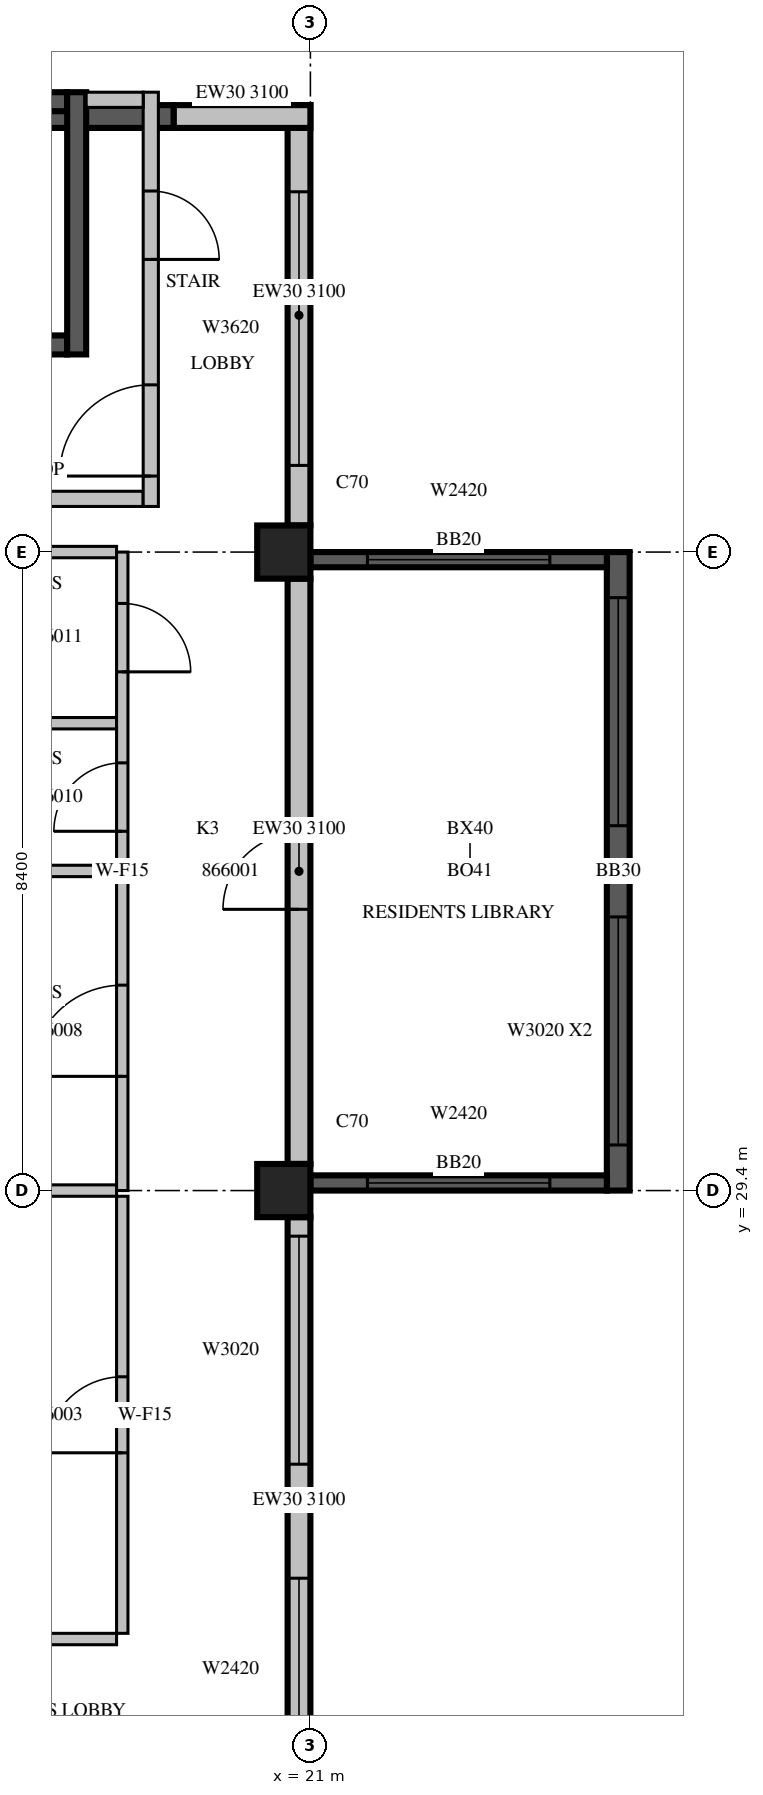
"""IFC4 building model, lengths in metres.
Left out: names, types, materials, properties, quantities, classifications, styles, units other than length and angle.
Written with IfcOpenShell. Run it as: python <this file> out.ifc"""

import sys

from ifc_helpers import new_model, si_unit, direction, frame, frame_2d, origin, origin_2d, place, context, subcontext, project, spatial, rectangle, extrude, source, transform, mapped, element, fill, save


model = new_model("IFC4")
c1 = context("Model", 3, precision=1e-05, world=origin(), true_north=direction((0.0, 1.0)))
c2 = subcontext(c1, "Body", "Model", "MODEL_VIEW")
j1 = project(units=[si_unit("LENGTHUNIT", "METRE"), si_unit("PLANEANGLEUNIT", "RADIAN")], contexts=[c1])
p1 = place(None, origin())
s1 = spatial("IfcSite", under=j1, at=p1, CompositionType="ELEMENT")
p2 = place(p1, origin())
s2 = spatial("IfcBuilding", under=s1, at=p2, CompositionType="ELEMENT")
p3 = place(p2, frame((0.0, 0.0, 291.5)))
s3 = spatial("IfcBuildingStorey", under=s2, at=p3, CompositionType="ELEMENT", Elevation=291.5)
m1 = source(origin(), c2, "Body", "SweptSolid", [
    extrude(rectangle(XDim=0.7, YDim=0.7, at=origin_2d()), origin(), (0.0, 0.0, 1.0), 3.5),
])
for number, where, z_axis, x_axis in (
    (1, (20.65, 29.4, 0.0), (0.0, 0.0, 1.0), (1.0, 0.0, 0.0)),
    (2, (20.65, 37.8, 0.0), (0.0, 0.0, 1.0), (1.0, 0.0, 0.0)),
):
    element("IfcColumn", number, at=place(p3, frame(where, z_axis=z_axis, x_axis=x_axis)), inside=s3, PredefinedType="COLUMN", context=c2, shape_type="MappedRepresentation", body=[
        mapped(m1, transform((0.0, 0.0, 0.0), scale=1.0)),
    ])
p4 = place(p3, frame((25.05, 29.4, 0.0), z_axis=(0.0, 0.0, 1.0), x_axis=(0.0, 1.0, 0.0)))
e3 = element("IfcWall", 3, at=p4, inside=s3, PredefinedType="SOLIDWALL", context=c2, shape_type="SweptSolid", body=[
    extrude(rectangle(XDim=8.4, YDim=0.3, at=frame_2d((4.2, 0.0))), origin(), (0.0, 0.0, 1.0), 3.1),
])
m2 = source(origin(), c2, "Body", "SweptSolid", [
    extrude(rectangle(XDim=3.0, YDim=2.0, at=frame_2d((1.5, 1.0))), frame((0.0, 0.16, 0.0), z_axis=(0.0, -1.0, 0.0), x_axis=(1.0, 0.0, 0.0)), (0.0, 0.0, 1.0), 0.32),
])
p5 = place(p4, frame((0.6, 0.0, 0.6)))
e4 = element("IfcOpeningElement", 4, at=p5, cuts=e3, PredefinedType="OPENING", context=c2, shape_type="MappedRepresentation", body=[
    mapped(m2, transform((0.0, 0.0, 0.0), scale=1.0)),
])
p6 = place(p4, frame((4.8, 0.0, 0.6)))
e5 = element("IfcOpeningElement", 5, at=p6, cuts=e3, PredefinedType="OPENING", context=c2, shape_type="MappedRepresentation", body=[
    mapped(m2, transform((0.0, 0.0, 0.0), scale=1.0)),
])
m3 = source(origin(), c2, "Body", "SweptSolid", [
    extrude(rectangle(XDim=3.9, YDim=0.2, at=frame_2d((1.95, 0.0))), origin(), (0.0, 0.0, 1.0), 3.1),
])
p7 = place(p3, frame((21.0, 29.5, 0.0), z_axis=(0.0, 0.0, 1.0), x_axis=(1.0, 0.0, 0.0)))
e6 = element("IfcWall", 6, at=p7, inside=s3, PredefinedType="SOLIDWALL", context=c2, shape_type="MappedRepresentation", body=[
    mapped(m3, transform((0.0, 0.0, 0.0), scale=1.0)),
])
m4 = source(origin(), c2, "Body", "SweptSolid", [
    extrude(rectangle(XDim=2.4, YDim=2.0, at=frame_2d((1.2, 1.0))), frame((0.0, 0.11, 0.0), z_axis=(0.0, -1.0, 0.0), x_axis=(1.0, 0.0, 0.0)), (0.0, 0.0, 1.0), 0.22),
])
p8 = place(p7, frame((0.75, 0.0, 0.6)))
e7 = element("IfcOpeningElement", 7, at=p8, cuts=e6, PredefinedType="OPENING", context=c2, shape_type="MappedRepresentation", body=[
    mapped(m4, transform((0.0, 0.0, 0.0), scale=1.0)),
])
p9 = place(p3, frame((21.0, 37.7, 0.0), z_axis=(0.0, 0.0, 1.0), x_axis=(1.0, 0.0, 0.0)))
e8 = element("IfcWall", 8, at=p9, inside=s3, PredefinedType="SOLIDWALL", context=c2, shape_type="MappedRepresentation", body=[
    mapped(m3, transform((0.0, 0.0, 0.0), scale=1.0)),
])
p10 = place(p9, frame((0.75, 0.0, 0.6)))
e9 = element("IfcOpeningElement", 9, at=p10, cuts=e8, PredefinedType="OPENING", context=c2, shape_type="MappedRepresentation", body=[
    mapped(m4, transform((0.0, 0.0, 0.0), scale=1.0)),
])
m5 = source(origin(), c2, "Body", "SweptSolid", [
    extrude(rectangle(XDim=7.45, YDim=0.3, at=frame_2d((3.725, 0.0))), origin(), (0.0, 0.0, 1.0), 3.1),
])
p11 = place(p3, frame((20.85, 21.6, 0.0), z_axis=(0.0, 0.0, 1.0), x_axis=(0.0, 1.0, 0.0)))
e10 = element("IfcWall", 10, at=p11, inside=s3, PredefinedType="STANDARD", context=c2, shape_type="MappedRepresentation", body=[
    mapped(m5, transform((0.0, 0.0, 0.0), scale=1.0)),
])
m6 = source(origin(), c2, "Body", "SweptSolid", [
    extrude(rectangle(XDim=2.4, YDim=2.0, at=frame_2d((1.2, 1.0))), frame((0.0, 0.16, 0.0), z_axis=(0.0, -1.0, 0.0), x_axis=(1.0, 0.0, 0.0)), (0.0, 0.0, 1.0), 0.32),
])
p12 = place(p11, frame((0.3, 0.0, 0.6)))
e11 = element("IfcOpeningElement", 11, at=p12, cuts=e10, PredefinedType="OPENING", context=c2, shape_type="MappedRepresentation", body=[
    mapped(m6, transform((0.0, 0.0, 0.0), scale=1.0)),
])
p13 = place(p11, frame((4.2, 0.0, 0.6)))
e12 = element("IfcOpeningElement", 12, at=p13, cuts=e10, PredefinedType="OPENING", context=c2, shape_type="MappedRepresentation", body=[
    mapped(m2, transform((0.0, 0.0, 0.0), scale=1.0)),
])
m7 = source(origin(), c2, "Body", "SweptSolid", [
    extrude(rectangle(XDim=7.7, YDim=0.3, at=frame_2d((3.85, 0.0))), origin(), (0.0, 0.0, 1.0), 3.1),
])
p14 = place(p3, frame((20.85, 29.75, 0.0), z_axis=(0.0, 0.0, 1.0), x_axis=(0.0, 1.0, 0.0)))
e13 = element("IfcWall", 13, at=p14, inside=s3, PredefinedType="STANDARD", context=c2, shape_type="MappedRepresentation", body=[
    mapped(m7, transform((0.0, 0.0, 0.0), scale=1.0)),
])
m8 = source(origin(), c2, "Body", "SweptSolid", [
    extrude(rectangle(XDim=1.0, YDim=2.1, at=frame_2d((0.5, 1.05))), frame((0.0, 0.16, 0.0), z_axis=(0.0, -1.0, 0.0), x_axis=(1.0, 0.0, 0.0)), (0.0, 0.0, 1.0), 0.32),
])
p15 = place(p14, frame((3.35, 0.0, 0.0)))
e14 = element("IfcOpeningElement", 14, at=p15, cuts=e13, PredefinedType="OPENING", context=c2, shape_type="MappedRepresentation", body=[
    mapped(m8, transform((0.0, 0.0, 0.0), scale=1.0)),
])
m9 = source(origin(), c2, "Body", "SweptSolid", [
    extrude(rectangle(XDim=5.53, YDim=0.3, at=frame_2d((2.765, 0.0))), origin(), (0.0, 0.0, 1.0), 3.1),
])
p16 = place(p3, frame((20.85, 38.15, 0.0), z_axis=(0.0, 0.0, 1.0), x_axis=(0.0, 1.0, 0.0)))
e15 = element("IfcWall", 15, at=p16, inside=s3, PredefinedType="STANDARD", context=c2, shape_type="MappedRepresentation", body=[
    mapped(m9, transform((0.0, 0.0, 0.0), scale=1.0)),
])
m10 = source(origin(), c2, "Body", "SweptSolid", [
    extrude(rectangle(XDim=3.6, YDim=2.0, at=frame_2d((1.8, 1.0))), frame((0.0, 0.16, 0.0), z_axis=(0.0, -1.0, 0.0), x_axis=(1.0, 0.0, 0.0)), (0.0, 0.0, 1.0), 0.32),
])
p17 = place(p16, frame((0.79, 0.0, 0.6)))
e16 = element("IfcOpeningElement", 16, at=p17, cuts=e15, PredefinedType="OPENING", context=c2, shape_type="MappedRepresentation", body=[
    mapped(m10, transform((0.0, 0.0, 0.0), scale=1.0)),
])
m11 = source(origin(), c2, "Body", "SweptSolid", [
    extrude(rectangle(XDim=1.8, YDim=0.3, at=frame_2d((0.9, 0.0))), origin(), (0.0, 0.0, 1.0), 3.1),
])
p18 = place(p3, frame((21.0, 43.53, 0.0), z_axis=(0.0, 0.0, 1.0), x_axis=(-1.0, 0.0, 0.0)))
e17 = element("IfcWall", 17, at=p18, inside=s3, PredefinedType="STANDARD", context=c2, shape_type="MappedRepresentation", body=[
    mapped(m11, transform((0.0, 0.0, 0.0), scale=1.0)),
])
m12 = source(origin(), c2, "Body", "SweptSolid", [
    extrude(rectangle(XDim=8.6, YDim=0.3, at=frame_2d((4.3, 0.0))), origin(), (0.0, 0.0, 1.0), 3.1),
])
p19 = place(p3, frame((19.2, 43.53, 0.0), z_axis=(0.0, 0.0, 1.0), x_axis=(-1.0, 0.0, 0.0)))
e18 = element("IfcWall", 18, at=p19, inside=s3, PredefinedType="SOLIDWALL", context=c2, shape_type="MappedRepresentation", body=[
    mapped(m12, transform((0.0, 0.0, 0.0), scale=1.0)),
])
m13 = source(origin(), c2, "Body", "SweptSolid", [
    extrude(rectangle(XDim=7.0, YDim=0.25, at=frame_2d((3.5, 0.0))), origin(), (0.0, 0.0, 1.0), 3.1),
])
p20 = place(p3, frame((10.8, 40.525, 0.0), z_axis=(0.0, 0.0, 1.0), x_axis=(1.0, 0.0, 0.0)))
e19 = element("IfcWall", 19, at=p20, inside=s3, PredefinedType="SOLIDWALL", context=c2, shape_type="MappedRepresentation", body=[
    mapped(m13, transform((0.0, 0.0, 0.0), scale=1.0)),
])
m14 = source(origin(), c2, "Body", "SweptSolid", [
    extrude(rectangle(XDim=1.1, YDim=2.1, at=frame_2d((0.55, 1.05))), frame((0.0, 0.135, 0.0), z_axis=(0.0, -1.0, 0.0), x_axis=(1.0, 0.0, 0.0)), (0.0, 0.0, 1.0), 0.27),
])
p21 = place(p20, frame((0.55, 0.0, 0.0)))
e20 = element("IfcOpeningElement", 20, at=p21, cuts=e19, PredefinedType="OPENING", context=c2, shape_type="MappedRepresentation", body=[
    mapped(m14, transform((0.0, 0.0, 0.0), scale=1.0)),
])
p22 = place(p3, frame((10.8, 43.725, 0.0), z_axis=(0.0, 0.0, 1.0), x_axis=(1.0, 0.0, 0.0)))
e21 = element("IfcWall", 21, at=p22, inside=s3, PredefinedType="SOLIDWALL", context=c2, shape_type="MappedRepresentation", body=[
    mapped(m13, transform((0.0, 0.0, 0.0), scale=1.0)),
])
m15 = source(origin(), c2, "Body", "SweptSolid", [
    extrude(rectangle(XDim=3.45, YDim=0.25, at=frame_2d((1.725, 0.0))), origin(), (0.0, 0.0, 1.0), 3.1),
])
p23 = place(p3, frame((17.925, 40.4, 0.0), z_axis=(0.0, 0.0, 1.0), x_axis=(0.0, 1.0, 0.0)))
e22 = element("IfcWall", 22, at=p23, inside=s3, PredefinedType="SOLIDWALL", context=c2, shape_type="MappedRepresentation", body=[
    mapped(m15, transform((0.0, 0.0, 0.0), scale=1.0)),
])
m16 = source(origin(), c2, "Body", "SweptSolid", [
    extrude(rectangle(XDim=8.0, YDim=0.2, at=frame_2d((4.0, 0.0))), origin(), (0.0, 0.0, 1.0), 3.1),
])
p24 = place(p3, frame((10.8, 38.5, 0.0), z_axis=(0.0, 0.0, 1.0), x_axis=(1.0, 0.0, 0.0)))
e23 = element("IfcWall", 23, at=p24, inside=s3, PredefinedType="PARTITIONING", context=c2, shape_type="MappedRepresentation", body=[
    mapped(m16, transform((0.0, 0.0, 0.0), scale=1.0)),
])
m17 = source(origin(), c2, "Body", "SweptSolid", [
    extrude(rectangle(XDim=5.45, YDim=0.2, at=frame_2d((2.725, 0.0))), origin(), (0.0, 0.0, 1.0), 3.1),
])
p25 = place(p3, frame((18.9, 38.4, 0.0), z_axis=(0.0, 0.0, 1.0), x_axis=(0.0, 1.0, 0.0)))
e24 = element("IfcWall", 24, at=p25, inside=s3, PredefinedType="PARTITIONING", context=c2, shape_type="MappedRepresentation", body=[
    mapped(m17, transform((0.0, 0.0, 0.0), scale=1.0)),
])
m18 = source(origin(), c2, "Body", "SweptSolid", [
    extrude(rectangle(XDim=1.2, YDim=2.1, at=frame_2d((0.6, 1.05))), frame((0.0, 0.11, 0.0), z_axis=(0.0, -1.0, 0.0), x_axis=(1.0, 0.0, 0.0)), (0.0, 0.0, 1.0), 0.22),
])
p26 = place(p25, frame((0.4, 0.0, 0.0)))
e25 = element("IfcOpeningElement", 25, at=p26, cuts=e24, PredefinedType="OPENING", context=c2, shape_type="MappedRepresentation", body=[
    mapped(m18, transform((0.0, 0.0, 0.0), scale=1.0)),
])
m19 = source(origin(), c2, "Body", "SweptSolid", [
    extrude(rectangle(XDim=0.9, YDim=2.1, at=frame_2d((0.45, 1.05))), frame((0.0, 0.11, 0.0), z_axis=(0.0, -1.0, 0.0), x_axis=(1.0, 0.0, 0.0)), (0.0, 0.0, 1.0), 0.22),
])
p27 = place(p25, frame((3.25, 0.0, 0.0)))
e26 = element("IfcOpeningElement", 26, at=p27, cuts=e24, PredefinedType="OPENING", context=c2, shape_type="MappedRepresentation", body=[
    mapped(m19, transform((0.0, 0.0, 0.0), scale=1.0)),
])
m20 = source(origin(), c2, "Body", "SweptSolid", [
    extrude(rectangle(XDim=0.75, YDim=0.2, at=frame_2d((0.375, 0.0))), origin(), (0.0, 0.0, 1.0), 3.1),
])
p28 = place(p3, frame((18.05, 43.75, 0.0), z_axis=(0.0, 0.0, 1.0), x_axis=(1.0, 0.0, 0.0)))
e27 = element("IfcWall", 27, at=p28, inside=s3, PredefinedType="PARTITIONING", context=c2, shape_type="MappedRepresentation", body=[
    mapped(m20, transform((0.0, 0.0, 0.0), scale=1.0)),
])
p29 = place(p3, frame((14.175, 23.5, 0.0), z_axis=(0.0, 0.0, 1.0), x_axis=(1.0, 0.0, 0.0)))
e28 = element("IfcWall", 28, at=p29, inside=s3, PredefinedType="PARTITIONING", context=c2, shape_type="SweptSolid", body=[
    extrude(rectangle(XDim=4.275, YDim=0.15, at=frame_2d((2.138, 0.0))), origin(), (0.0, 0.0, 1.0), 3.1),
])
m21 = source(origin(), c2, "Body", "SweptSolid", [
    extrude(rectangle(XDim=0.9, YDim=2.1, at=frame_2d((0.45, 1.05))), frame((0.0, 0.085, 0.0), z_axis=(0.0, -1.0, 0.0), x_axis=(1.0, 0.0, 0.0)), (0.0, 0.0, 1.0), 0.17),
])
p30 = place(p29, frame((0.619, 0.0, 0.0)))
e29 = element("IfcOpeningElement", 29, at=p30, cuts=e28, PredefinedType="OPENING", context=c2, shape_type="MappedRepresentation", body=[
    mapped(m21, transform((0.0, 0.0, 0.0), scale=1.0)),
])
m22 = source(origin(), c2, "Body", "SweptSolid", [
    extrude(rectangle(XDim=4.275, YDim=0.15, at=frame_2d((2.138, 0.0))), origin(), (0.0, 0.0, 1.0), 3.1),
])
p31 = place(p3, frame((18.45, 29.4, 0.0), z_axis=(0.0, 0.0, 1.0), x_axis=(-1.0, 0.0, 0.0)))
e30 = element("IfcWall", 30, at=p31, inside=s3, PredefinedType="PARTITIONING", context=c2, shape_type="MappedRepresentation", body=[
    mapped(m22, transform((0.0, 0.0, 0.0), scale=1.0)),
])
m23 = source(origin(), c2, "Body", "SweptSolid", [
    extrude(rectangle(XDim=5.75, YDim=0.15, at=frame_2d((2.875, 0.0))), origin(), (0.0, 0.0, 1.0), 3.1),
])
p32 = place(p3, frame((18.525, 23.575, 0.0), z_axis=(0.0, 0.0, 1.0), x_axis=(0.0, 1.0, 0.0)))
e31 = element("IfcWall", 31, at=p32, inside=s3, PredefinedType="PARTITIONING", context=c2, shape_type="MappedRepresentation", body=[
    mapped(m23, transform((0.0, 0.0, 0.0), scale=1.0)),
])
m24 = source(origin(), c2, "Body", "SweptSolid", [
    extrude(rectangle(XDim=1.0, YDim=2.1, at=frame_2d((0.5, 1.05))), frame((0.0, 0.085, 0.0), z_axis=(0.0, -1.0, 0.0), x_axis=(1.0, 0.0, 0.0)), (0.0, 0.0, 1.0), 0.17),
])
p33 = place(p32, frame((2.375, 0.0, 0.0)))
e32 = element("IfcOpeningElement", 32, at=p33, cuts=e31, PredefinedType="OPENING", context=c2, shape_type="MappedRepresentation", body=[
    mapped(m24, transform((0.0, 0.0, 0.0), scale=1.0)),
])
p34 = place(p3, frame((18.45, 33.605, 0.0), z_axis=(0.0, 0.0, 1.0), x_axis=(-1.0, 0.0, 0.0)))
e33 = element("IfcWall", 33, at=p34, inside=s3, PredefinedType="PARTITIONING", context=c2, shape_type="SweptSolid", body=[
    extrude(rectangle(XDim=2.8, YDim=0.15, at=frame_2d((1.4, 0.0))), origin(), (0.0, 0.0, 1.0), 3.1),
])
m25 = source(origin(), c2, "Body", "SweptSolid", [
    extrude(rectangle(XDim=2.8, YDim=0.15, at=frame_2d((1.4, 0.0))), origin(), (0.0, 0.0, 1.0), 3.1),
])
for number, where, z_axis, x_axis in (
    (34, (18.45, 35.548, 0.0), (0.0, 0.0, 1.0), (-1.0, 0.0, 0.0)),
    (35, (18.45, 37.8, 0.0), (0.0, 0.0, 1.0), (-1.0, 0.0, 0.0)),
):
    element("IfcWall", number, at=place(p3, frame(where, z_axis=z_axis, x_axis=x_axis)), inside=s3, PredefinedType="PARTITIONING", context=c2, shape_type="MappedRepresentation", body=[
        mapped(m25, transform((0.0, 0.0, 0.0), scale=1.0)),
    ])
m26 = source(origin(), c2, "Body", "SweptSolid", [
    extrude(rectangle(XDim=8.4, YDim=0.15, at=frame_2d((4.2, 0.0))), origin(), (0.0, 0.0, 1.0), 3.1),
])
p35 = place(p3, frame((18.525, 29.4, 0.0), z_axis=(0.0, 0.0, 1.0), x_axis=(0.0, 1.0, 0.0)))
e36 = element("IfcWall", 36, at=p35, inside=s3, PredefinedType="PARTITIONING", context=c2, shape_type="MappedRepresentation", body=[
    mapped(m26, transform((0.0, 0.0, 0.0), scale=1.0)),
])
m27 = source(origin(), c2, "Body", "SweptSolid", [
    extrude(rectangle(XDim=1.2, YDim=2.1, at=frame_2d((0.6, 1.05))), frame((0.0, 0.085, 0.0), z_axis=(0.0, -1.0, 0.0), x_axis=(1.0, 0.0, 0.0)), (0.0, 0.0, 1.0), 0.17),
])
p36 = place(p35, frame((1.502, 0.0, 0.0)))
e37 = element("IfcOpeningElement", 37, at=p36, cuts=e36, PredefinedType="OPENING", context=c2, shape_type="MappedRepresentation", body=[
    mapped(m27, transform((0.0, 0.0, 0.0), scale=1.0)),
])
p37 = place(p35, frame((4.727, 0.0, 0.0)))
e38 = element("IfcOpeningElement", 38, at=p37, cuts=e36, PredefinedType="OPENING", context=c2, shape_type="MappedRepresentation", body=[
    mapped(m21, transform((0.0, 0.0, 0.0), scale=1.0)),
])
p38 = place(p35, frame((6.824, 0.0, 0.0)))
e39 = element("IfcOpeningElement", 39, at=p38, cuts=e36, PredefinedType="OPENING", context=c2, shape_type="MappedRepresentation", body=[
    mapped(m21, transform((0.0, 0.0, 0.0), scale=1.0)),
])
m28 = source(origin(), c2, "Body", "SweptSolid", [
    extrude(rectangle(XDim=3.0, YDim=2.0, at=frame_2d((1.5, 1.0))), frame((0.0, 0.03, 0.0), z_axis=(0.0, -1.0, 0.0), x_axis=(1.0, 0.0, 0.0)), (0.0, 0.0, 1.0), 0.06),
])
p39 = place(p5, origin())
e40 = element("IfcWindow", 40, at=p39, inside=s3, PartitioningType="SINGLE_PANEL", PredefinedType="WINDOW", context=c2, shape_type="MappedRepresentation", body=[
    mapped(m28, transform((0.0, 0.0, 0.0), scale=1.0)),
])
fill(e4, e40)
p40 = place(p6, origin())
e41 = element("IfcWindow", 41, at=p40, inside=s3, PartitioningType="SINGLE_PANEL", PredefinedType="WINDOW", context=c2, shape_type="MappedRepresentation", body=[
    mapped(m28, transform((0.0, 0.0, 0.0), scale=1.0)),
])
fill(e5, e41)
m29 = source(origin(), c2, "Body", "SweptSolid", [
    extrude(rectangle(XDim=2.4, YDim=2.0, at=frame_2d((1.2, 1.0))), frame((0.0, 0.03, 0.0), z_axis=(0.0, -1.0, 0.0), x_axis=(1.0, 0.0, 0.0)), (0.0, 0.0, 1.0), 0.06),
])
p41 = place(p8, origin())
e42 = element("IfcWindow", 42, at=p41, inside=s3, PartitioningType="SINGLE_PANEL", PredefinedType="WINDOW", context=c2, shape_type="MappedRepresentation", body=[
    mapped(m29, transform((0.0, 0.0, 0.0), scale=1.0)),
])
fill(e7, e42)
p42 = place(p10, origin())
e43 = element("IfcWindow", 43, at=p42, inside=s3, PartitioningType="SINGLE_PANEL", PredefinedType="WINDOW", context=c2, shape_type="MappedRepresentation", body=[
    mapped(m29, transform((0.0, 0.0, 0.0), scale=1.0)),
])
fill(e9, e43)
p43 = place(p12, origin())
e44 = element("IfcWindow", 44, at=p43, inside=s3, PartitioningType="SINGLE_PANEL", PredefinedType="WINDOW", context=c2, shape_type="MappedRepresentation", body=[
    mapped(m29, transform((0.0, 0.0, 0.0), scale=1.0)),
])
fill(e11, e44)
p44 = place(p13, origin())
e45 = element("IfcWindow", 45, at=p44, inside=s3, PartitioningType="SINGLE_PANEL", PredefinedType="WINDOW", context=c2, shape_type="MappedRepresentation", body=[
    mapped(m28, transform((0.0, 0.0, 0.0), scale=1.0)),
])
fill(e12, e45)
m30 = source(origin(), c2, "Body", "SweptSolid", [
    extrude(rectangle(XDim=3.6, YDim=2.0, at=frame_2d((1.8, 1.0))), frame((0.0, 0.03, 0.0), z_axis=(0.0, -1.0, 0.0), x_axis=(1.0, 0.0, 0.0)), (0.0, 0.0, 1.0), 0.06),
])
p45 = place(p17, origin())
e46 = element("IfcWindow", 46, at=p45, inside=s3, PartitioningType="SINGLE_PANEL", PredefinedType="WINDOW", context=c2, shape_type="MappedRepresentation", body=[
    mapped(m30, transform((0.0, 0.0, 0.0), scale=1.0)),
])
fill(e16, e46)
m31 = source(origin(), c2, "Body", "SweptSolid", [
    extrude(rectangle(XDim=1.2, YDim=2.1, at=frame_2d((0.6, 1.05))), frame((0.0, 0.025, 0.0), z_axis=(0.0, -1.0, 0.0), x_axis=(1.0, 0.0, 0.0)), (0.0, 0.0, 1.0), 0.05),
])
p46 = place(p26, origin())
e47 = element("IfcDoor", 47, at=p46, inside=s3, OperationType="SINGLE_SWING_LEFT", PredefinedType="DOOR", context=c2, shape_type="MappedRepresentation", body=[
    mapped(m31, transform((0.0, 0.0, 0.0), scale=1.0)),
])
fill(e25, e47)
m32 = source(origin(), c2, "Body", "SweptSolid", [
    extrude(rectangle(XDim=0.9, YDim=2.1, at=frame_2d((0.45, 1.05))), frame((0.0, 0.025, 0.0), z_axis=(0.0, -1.0, 0.0), x_axis=(1.0, 0.0, 0.0)), (0.0, 0.0, 1.0), 0.05),
])
p47 = place(p27, origin())
e48 = element("IfcDoor", 48, at=p47, inside=s3, OperationType="SINGLE_SWING_RIGHT", PredefinedType="DOOR", context=c2, shape_type="MappedRepresentation", body=[
    mapped(m32, transform((0.0, 0.0, 0.0), scale=1.0)),
])
fill(e26, e48)
m33 = source(origin(), c2, "Body", "SweptSolid", [
    extrude(rectangle(XDim=1.0, YDim=2.1, at=frame_2d((0.5, 1.05))), frame((0.0, 0.025, 0.0), z_axis=(0.0, -1.0, 0.0), x_axis=(1.0, 0.0, 0.0)), (0.0, 0.0, 1.0), 0.05),
])
p48 = place(p33, origin())
e49 = element("IfcDoor", 49, at=p48, inside=s3, OperationType="SINGLE_SWING_LEFT", PredefinedType="DOOR", context=c2, shape_type="MappedRepresentation", body=[
    mapped(m33, transform((0.0, 0.0, 0.0), scale=1.0)),
])
fill(e32, e49)
p49 = place(p36, origin())
e50 = element("IfcDoor", 50, at=p49, inside=s3, OperationType="SINGLE_SWING_LEFT", PredefinedType="DOOR", context=c2, shape_type="MappedRepresentation", body=[
    mapped(m31, transform((0.0, 0.0, 0.0), scale=1.0)),
])
fill(e37, e50)
p50 = place(p37, origin())
e51 = element("IfcDoor", 51, at=p50, inside=s3, OperationType="SINGLE_SWING_LEFT", PredefinedType="DOOR", context=c2, shape_type="MappedRepresentation", body=[
    mapped(m32, transform((0.0, 0.0, 0.0), scale=1.0)),
])
fill(e38, e51)
p51 = place(p38, origin())
e52 = element("IfcDoor", 52, at=p51, inside=s3, OperationType="SINGLE_SWING_RIGHT", PredefinedType="DOOR", context=c2, shape_type="MappedRepresentation", body=[
    mapped(m32, transform((0.0, 0.0, 0.0), scale=1.0)),
])
fill(e39, e52)
p52 = place(p15, origin())
e53 = element("IfcDoor", 53, at=p52, inside=s3, OperationType="SINGLE_SWING_LEFT", PredefinedType="DOOR", context=c2, shape_type="MappedRepresentation", body=[
    mapped(m33, transform((0.0, 0.0, 0.0), scale=1.0)),
])
fill(e14, e53)
save(model, sys.argv[1])
